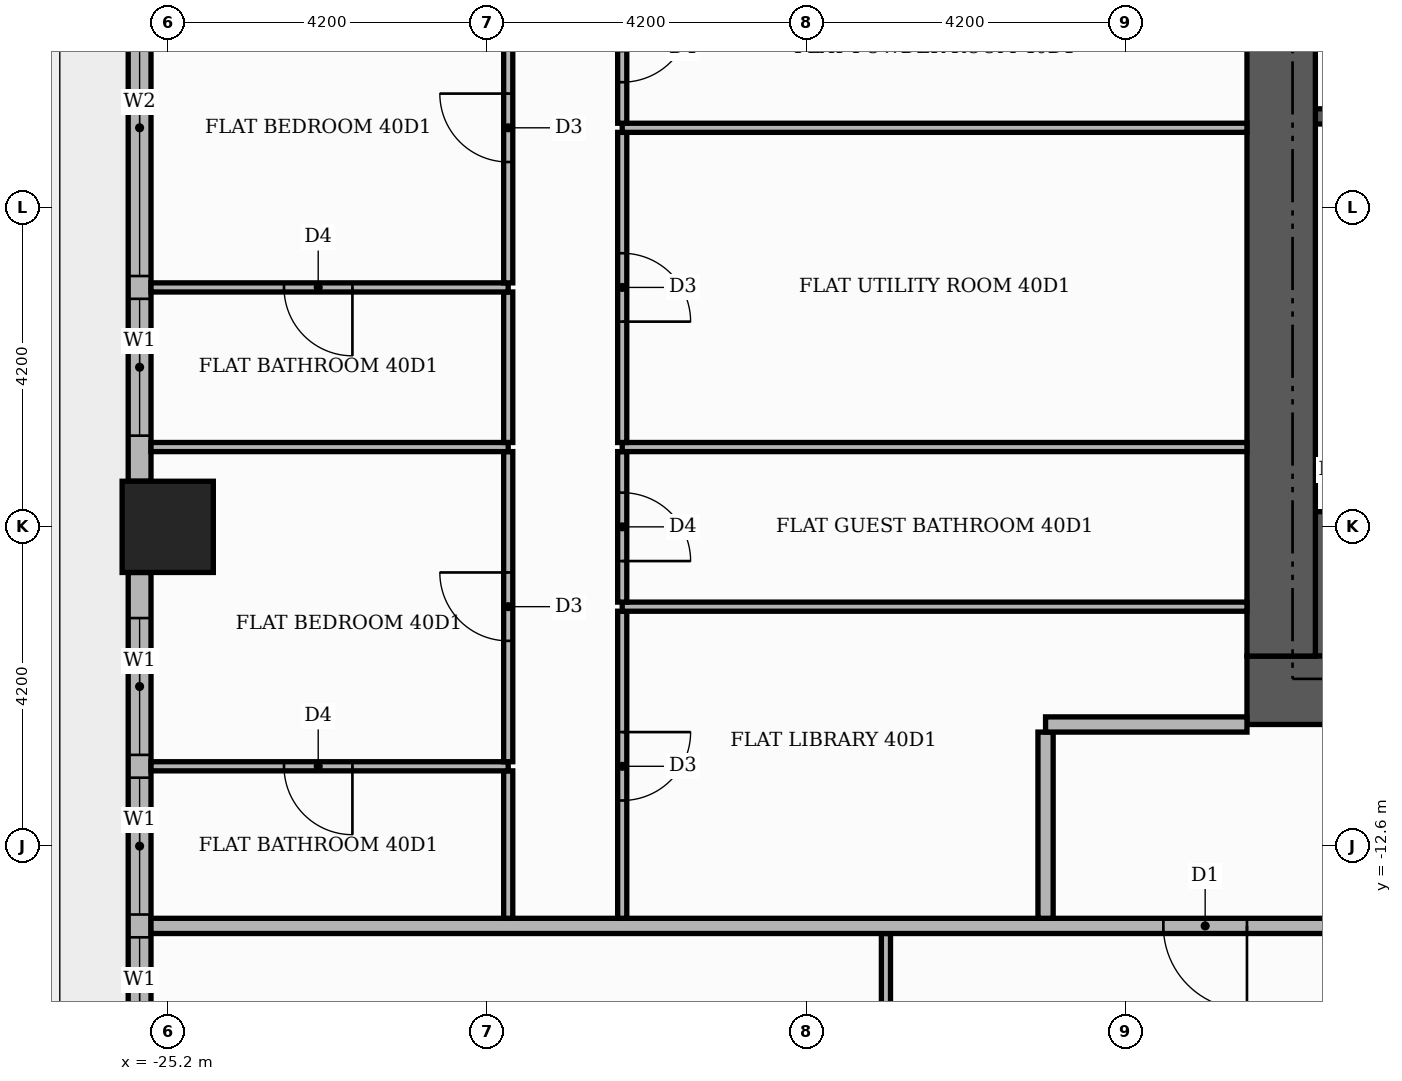
"""IFC4 building model, lengths in metres.
Left out: names, types, materials, properties, quantities, classifications, styles, units other than length and angle.
Written with IfcOpenShell. Run it as: python <this file> out.ifc"""

import sys

from ifc_helpers import new_model, si_unit, direction, frame, frame_2d, origin, origin_2d, place, context, subcontext, project, spatial, rectangle, extrude, element, fill, save


model = new_model("IFC4")
c1 = context("Model", 3, precision=1e-05, world=origin(), true_north=direction((0.0, 1.0)))
c2 = subcontext(c1, "Body", "Model", "MODEL_VIEW")
j1 = project(units=[si_unit("LENGTHUNIT", "METRE"), si_unit("PLANEANGLEUNIT", "RADIAN")], contexts=[c1])
p1 = place(None, origin())
s1 = spatial("IfcSite", under=j1, at=p1, CompositionType="ELEMENT")
p2 = place(p1, origin())
s2 = spatial("IfcBuilding", under=s1, at=p2, CompositionType="ELEMENT")
p3 = place(p2, frame((0.0, 0.0, 168.9)))
s3 = spatial("IfcBuildingStorey", under=s2, at=p3, CompositionType="ELEMENT", Elevation=168.9)
p4 = place(p3, frame((-10.1, -9.15, 0.0), z_axis=(0.0, 0.0, 1.0), x_axis=(1.0, 0.0, 0.0)))
e1 = element("IfcWall", 1, at=p4, inside=s3, PredefinedType="SHEAR", context=c2, shape_type="SweptSolid", body=[
    extrude(rectangle(XDim=4.6, YDim=1.9, at=frame_2d((2.3, 0.0))), origin(), (0.0, 0.0, 1.0), 3.48),
])
p5 = place(p3, frame((-10.1, -3.0, 0.0), z_axis=(0.0, 0.0, 1.0), x_axis=(1.0, 0.0, 0.0)))
e2 = element("IfcWall", 2, at=p5, inside=s3, PredefinedType="SHEAR", context=c2, shape_type="SweptSolid", body=[
    extrude(rectangle(XDim=0.9, YDim=0.2, at=frame_2d((0.45, 0.0))), origin(), (0.0, 0.0, 1.0), 3.48),
])
p6 = place(p3, frame((-11.0, -10.55, 0.0), z_axis=(0.0, 0.0, 1.0), x_axis=(1.0, 0.0, 0.0)))
e3 = element("IfcWall", 3, at=p6, inside=s3, PredefinedType="SHEAR", context=c2, shape_type="SweptSolid", body=[
    extrude(rectangle(XDim=22.0, YDim=0.9, at=frame_2d((11.0, 0.0))), origin(), (0.0, 0.0, 1.0), 3.48),
])
p7 = place(p6, frame((7.4, 0.0, 0.0)))
e4 = element("IfcOpeningElement", 4, at=p7, cuts=e3, PredefinedType="OPENING", context=c2, shape_type="SweptSolid", body=[
    extrude(rectangle(XDim=1.8, YDim=2.2, at=frame_2d((0.9, 1.1))), frame((0.0, 0.46, 0.0), z_axis=(0.0, -1.0, 0.0), x_axis=(1.0, 0.0, 0.0)), (0.0, 0.0, 1.0), 0.92),
])
p8 = place(p3, frame((-10.55, -10.1, 0.0), z_axis=(0.0, 0.0, 1.0), x_axis=(0.0, 1.0, 0.0)))
e5 = element("IfcWall", 5, at=p8, inside=s3, PredefinedType="SHEAR", context=c2, shape_type="SweptSolid", body=[
    extrude(rectangle(XDim=20.2, YDim=0.9, at=frame_2d((10.1, 0.0))), origin(), (0.0, 0.0, 1.0), 3.48),
])
p9 = place(p3, frame((-25.2, -8.4, 0.0), z_axis=(0.0, 0.0, 1.0), x_axis=(1.0, 0.0, 0.0)))
e6 = element("IfcColumn", 6, at=p9, inside=s3, PredefinedType="COLUMN", context=c2, shape_type="SweptSolid", body=[
    extrude(rectangle(XDim=1.2, YDim=1.2, at=origin_2d()), origin(), (0.0, 0.0, 1.0), 3.9),
])
p10 = place(p3, frame((-25.57, -0.6, 0.0), z_axis=(0.0, 0.0, 1.0), x_axis=(0.0, -1.0, 0.0)))
e7 = element("IfcWall", 7, at=p10, inside=s3, PredefinedType="STANDARD", context=c2, shape_type="SweptSolid", body=[
    extrude(rectangle(XDim=7.2, YDim=0.3, at=frame_2d((3.6, 0.0))), origin(), (0.0, 0.0, 1.0), 3.48),
])
p11 = place(p10, frame((0.6, 0.0, 0.9)))
e8 = element("IfcOpeningElement", 8, at=p11, cuts=e7, PredefinedType="OPENING", context=c2, shape_type="SweptSolid", body=[
    extrude(rectangle(XDim=3.9, YDim=2.1, at=frame_2d((1.95, 1.05))), frame((0.0, 0.16, 0.0), z_axis=(0.0, -1.0, 0.0), x_axis=(1.0, 0.0, 0.0)), (0.0, 0.0, 1.0), 0.32),
])
p12 = place(p10, frame((4.8, 0.0, 0.9)))
e9 = element("IfcOpeningElement", 9, at=p12, cuts=e7, PredefinedType="OPENING", context=c2, shape_type="SweptSolid", body=[
    extrude(rectangle(XDim=1.8, YDim=2.1, at=frame_2d((0.9, 1.05))), frame((0.0, 0.16, 0.0), z_axis=(0.0, -1.0, 0.0), x_axis=(1.0, 0.0, 0.0)), (0.0, 0.0, 1.0), 0.32),
])
p13 = place(p3, frame((-25.57, -9.0, 0.0), z_axis=(0.0, 0.0, 1.0), x_axis=(0.0, -1.0, 0.0)))
e10 = element("IfcWall", 10, at=p13, inside=s3, PredefinedType="STANDARD", context=c2, shape_type="SweptSolid", body=[
    extrude(rectangle(XDim=7.2, YDim=0.3, at=frame_2d((3.6, 0.0))), origin(), (0.0, 0.0, 1.0), 3.48),
])
p14 = place(p13, frame((0.6, 0.0, 0.9)))
e11 = element("IfcOpeningElement", 11, at=p14, cuts=e10, PredefinedType="OPENING", context=c2, shape_type="SweptSolid", body=[
    extrude(rectangle(XDim=1.8, YDim=2.1, at=frame_2d((0.9, 1.05))), frame((0.0, 0.16, 0.0), z_axis=(0.0, -1.0, 0.0), x_axis=(1.0, 0.0, 0.0)), (0.0, 0.0, 1.0), 0.32),
])
p15 = place(p13, frame((2.7, 0.0, 0.9)))
e12 = element("IfcOpeningElement", 12, at=p15, cuts=e10, PredefinedType="OPENING", context=c2, shape_type="SweptSolid", body=[
    extrude(rectangle(XDim=1.8, YDim=2.1, at=frame_2d((0.9, 1.05))), frame((0.0, 0.16, 0.0), z_axis=(0.0, -1.0, 0.0), x_axis=(1.0, 0.0, 0.0)), (0.0, 0.0, 1.0), 0.32),
])
p16 = place(p13, frame((4.8, 0.0, 0.9)))
e13 = element("IfcOpeningElement", 13, at=p16, cuts=e10, PredefinedType="OPENING", context=c2, shape_type="SweptSolid", body=[
    extrude(rectangle(XDim=1.8, YDim=2.1, at=frame_2d((0.9, 1.05))), frame((0.0, 0.16, 0.0), z_axis=(0.0, -1.0, 0.0), x_axis=(1.0, 0.0, 0.0)), (0.0, 0.0, 1.0), 0.32),
])
p17 = place(p3, frame((-15.75, -20.06, 0.0), z_axis=(0.0, 0.0, 1.0), x_axis=(0.0, 1.0, 0.0)))
e14 = element("IfcWall", 14, at=p17, inside=s3, PredefinedType="PARTITIONING", context=c2, shape_type="SweptSolid", body=[
    extrude(rectangle(XDim=6.31, YDim=0.12, at=frame_2d((3.155, 0.0))), origin(), (0.0, 0.0, 1.0), 3.48),
])
p18 = place(p17, frame((2.675, 0.0, 0.0)))
e15 = element("IfcOpeningElement", 15, at=p18, cuts=e14, PredefinedType="OPENING", context=c2, shape_type="SweptSolid", body=[
    extrude(rectangle(XDim=1.0, YDim=2.1, at=frame_2d((0.5, 1.05))), frame((0.0, 0.07, 0.0), z_axis=(0.0, -1.0, 0.0), x_axis=(1.0, 0.0, 0.0)), (0.0, 0.0, 1.0), 0.14),
])
p19 = place(p3, frame((-25.42, -13.65, 0.0), z_axis=(0.0, 0.0, 1.0), x_axis=(1.0, 0.0, 0.0)))
e16 = element("IfcWall", 16, at=p19, inside=s3, PredefinedType="PARTITIONING", context=c2, shape_type="SweptSolid", body=[
    extrude(rectangle(XDim=39.07, YDim=0.2, at=frame_2d((19.535, 0.0))), origin(), (0.0, 0.0, 1.0), 3.48),
])
p20 = place(p19, frame((13.32, 0.0, 0.0)))
e17 = element("IfcOpeningElement", 17, at=p20, cuts=e16, PredefinedType="OPENING", context=c2, shape_type="SweptSolid", body=[
    extrude(rectangle(XDim=1.1, YDim=2.4, at=frame_2d((0.55, 1.2))), frame((0.0, 0.11, 0.0), z_axis=(0.0, -1.0, 0.0), x_axis=(1.0, 0.0, 0.0)), (0.0, 0.0, 1.0), 0.22),
])
p21 = place(p19, frame((21.72, 0.0, 0.0)))
e18 = element("IfcOpeningElement", 18, at=p21, cuts=e16, PredefinedType="OPENING", context=c2, shape_type="SweptSolid", body=[
    extrude(rectangle(XDim=1.1, YDim=2.4, at=frame_2d((0.55, 1.2))), frame((0.0, 0.11, 0.0), z_axis=(0.0, -1.0, 0.0), x_axis=(1.0, 0.0, 0.0)), (0.0, 0.0, 1.0), 0.22),
])
p22 = place(p3, frame((-20.72, -13.55, 0.0), z_axis=(0.0, 0.0, 1.0), x_axis=(0.0, 1.0, 0.0)))
e19 = element("IfcWall", 19, at=p22, inside=s3, PredefinedType="PARTITIONING", context=c2, shape_type="SweptSolid", body=[
    extrude(rectangle(XDim=1.94, YDim=0.12, at=frame_2d((0.97, 0.0))), origin(), (0.0, 0.0, 1.0), 3.48),
])
p23 = place(p3, frame((-19.22, -13.55, 0.0), z_axis=(0.0, 0.0, 1.0), x_axis=(0.0, 1.0, 0.0)))
e20 = element("IfcWall", 20, at=p23, inside=s3, PredefinedType="PARTITIONING", context=c2, shape_type="SweptSolid", body=[
    extrude(rectangle(XDim=4.04, YDim=0.12, at=frame_2d((2.02, 0.0))), origin(), (0.0, 0.0, 1.0), 3.48),
])
p24 = place(p23, frame((1.55, 0.0, 0.0)))
e21 = element("IfcOpeningElement", 21, at=p24, cuts=e20, PredefinedType="OPENING", context=c2, shape_type="SweptSolid", body=[
    extrude(rectangle(XDim=0.9, YDim=2.1, at=frame_2d((0.45, 1.05))), frame((0.0, 0.07, 0.0), z_axis=(0.0, -1.0, 0.0), x_axis=(1.0, 0.0, 0.0)), (0.0, 0.0, 1.0), 0.14),
])
p25 = place(p3, frame((-13.65, -13.55, 0.0), z_axis=(0.0, 0.0, 1.0), x_axis=(0.0, 1.0, 0.0)))
e22 = element("IfcWall", 22, at=p25, inside=s3, PredefinedType="PARTITIONING", context=c2, shape_type="SweptSolid", body=[
    extrude(rectangle(XDim=2.45, YDim=0.2, at=frame_2d((1.225, 0.0))), origin(), (0.0, 0.0, 1.0), 3.48),
])
p26 = place(p3, frame((-25.42, -11.55, 0.0), z_axis=(0.0, 0.0, 1.0), x_axis=(1.0, 0.0, 0.0)))
e23 = element("IfcWall", 23, at=p26, inside=s3, PredefinedType="PARTITIONING", context=c2, shape_type="SweptSolid", body=[
    extrude(rectangle(XDim=4.7, YDim=0.12, at=frame_2d((2.35, 0.0))), origin(), (0.0, 0.0, 1.0), 3.48),
])
p27 = place(p26, frame((1.75, 0.0, 0.0)))
e24 = element("IfcOpeningElement", 24, at=p27, cuts=e23, PredefinedType="OPENING", context=c2, shape_type="SweptSolid", body=[
    extrude(rectangle(XDim=0.9, YDim=2.1, at=frame_2d((0.45, 1.05))), frame((0.0, 0.07, 0.0), z_axis=(0.0, -1.0, 0.0), x_axis=(1.0, 0.0, 0.0)), (0.0, 0.0, 1.0), 0.14),
])
p28 = place(p3, frame((-20.72, -11.49, 0.0), z_axis=(0.0, 0.0, 1.0), x_axis=(0.0, 1.0, 0.0)))
e25 = element("IfcWall", 25, at=p28, inside=s3, PredefinedType="PARTITIONING", context=c2, shape_type="SweptSolid", body=[
    extrude(rectangle(XDim=4.08, YDim=0.12, at=frame_2d((2.04, 0.0))), origin(), (0.0, 0.0, 1.0), 3.48),
])
p29 = place(p28, frame((1.59, 0.0, 0.0)))
e26 = element("IfcOpeningElement", 26, at=p29, cuts=e25, PredefinedType="OPENING", context=c2, shape_type="SweptSolid", body=[
    extrude(rectangle(XDim=0.9, YDim=2.1, at=frame_2d((0.45, 1.05))), frame((0.0, 0.07, 0.0), z_axis=(0.0, -1.0, 0.0), x_axis=(1.0, 0.0, 0.0)), (0.0, 0.0, 1.0), 0.14),
])
p30 = place(p3, frame((-13.65, -11.0, 0.0), z_axis=(0.0, 0.0, 1.0), x_axis=(1.0, 0.0, 0.0)))
e27 = element("IfcWall", 27, at=p30, inside=s3, PredefinedType="PARTITIONING", context=c2, shape_type="SweptSolid", body=[
    extrude(rectangle(XDim=2.65, YDim=0.2, at=frame_2d((1.325, 0.0))), origin(), (0.0, 0.0, 1.0), 3.48),
])
p31 = place(p3, frame((-19.22, -9.45, 0.0), z_axis=(0.0, 0.0, 1.0), x_axis=(1.0, 0.0, 0.0)))
e28 = element("IfcWall", 28, at=p31, inside=s3, PredefinedType="PARTITIONING", context=c2, shape_type="SweptSolid", body=[
    extrude(rectangle(XDim=8.22, YDim=0.12, at=frame_2d((4.11, 0.0))), origin(), (0.0, 0.0, 1.0), 3.48),
])
p32 = place(p3, frame((-19.22, -9.39, 0.0), z_axis=(0.0, 0.0, 1.0), x_axis=(0.0, 1.0, 0.0)))
e29 = element("IfcWall", 29, at=p32, inside=s3, PredefinedType="PARTITIONING", context=c2, shape_type="SweptSolid", body=[
    extrude(rectangle(XDim=1.98, YDim=0.12, at=frame_2d((0.99, 0.0))), origin(), (0.0, 0.0, 1.0), 3.48),
])
p33 = place(p32, frame((0.54, 0.0, 0.0)))
e30 = element("IfcOpeningElement", 30, at=p33, cuts=e29, PredefinedType="OPENING", context=c2, shape_type="SweptSolid", body=[
    extrude(rectangle(XDim=0.9, YDim=2.1, at=frame_2d((0.45, 1.05))), frame((0.0, 0.07, 0.0), z_axis=(0.0, -1.0, 0.0), x_axis=(1.0, 0.0, 0.0)), (0.0, 0.0, 1.0), 0.14),
])
p34 = place(p3, frame((-25.42, -7.35, 0.0), z_axis=(0.0, 0.0, 1.0), x_axis=(1.0, 0.0, 0.0)))
e31 = element("IfcWall", 31, at=p34, inside=s3, PredefinedType="PARTITIONING", context=c2, shape_type="SweptSolid", body=[
    extrude(rectangle(XDim=4.7, YDim=0.12, at=frame_2d((2.35, 0.0))), origin(), (0.0, 0.0, 1.0), 3.48),
])
p35 = place(p3, frame((-19.22, -7.35, 0.0), z_axis=(0.0, 0.0, 1.0), x_axis=(1.0, 0.0, 0.0)))
e32 = element("IfcWall", 32, at=p35, inside=s3, PredefinedType="PARTITIONING", context=c2, shape_type="SweptSolid", body=[
    extrude(rectangle(XDim=8.22, YDim=0.12, at=frame_2d((4.11, 0.0))), origin(), (0.0, 0.0, 1.0), 3.48),
])
p36 = place(p3, frame((-20.72, -7.29, 0.0), z_axis=(0.0, 0.0, 1.0), x_axis=(0.0, 1.0, 0.0)))
e33 = element("IfcWall", 33, at=p36, inside=s3, PredefinedType="PARTITIONING", context=c2, shape_type="SweptSolid", body=[
    extrude(rectangle(XDim=1.98, YDim=0.12, at=frame_2d((0.99, 0.0))), origin(), (0.0, 0.0, 1.0), 3.48),
])
p37 = place(p3, frame((-19.22, -7.29, 0.0), z_axis=(0.0, 0.0, 1.0), x_axis=(0.0, 1.0, 0.0)))
e34 = element("IfcWall", 34, at=p37, inside=s3, PredefinedType="PARTITIONING", context=c2, shape_type="SweptSolid", body=[
    extrude(rectangle(XDim=4.08, YDim=0.12, at=frame_2d((2.04, 0.0))), origin(), (0.0, 0.0, 1.0), 3.48),
])
p38 = place(p37, frame((1.59, 0.0, 0.0)))
e35 = element("IfcOpeningElement", 35, at=p38, cuts=e34, PredefinedType="OPENING", context=c2, shape_type="SweptSolid", body=[
    extrude(rectangle(XDim=0.9, YDim=2.1, at=frame_2d((0.45, 1.05))), frame((0.0, 0.07, 0.0), z_axis=(0.0, -1.0, 0.0), x_axis=(1.0, 0.0, 0.0)), (0.0, 0.0, 1.0), 0.14),
])
p39 = place(p3, frame((-25.42, -5.25, 0.0), z_axis=(0.0, 0.0, 1.0), x_axis=(1.0, 0.0, 0.0)))
e36 = element("IfcWall", 36, at=p39, inside=s3, PredefinedType="PARTITIONING", context=c2, shape_type="SweptSolid", body=[
    extrude(rectangle(XDim=4.7, YDim=0.12, at=frame_2d((2.35, 0.0))), origin(), (0.0, 0.0, 1.0), 3.48),
])
p40 = place(p39, frame((1.75, 0.0, 0.0)))
e37 = element("IfcOpeningElement", 37, at=p40, cuts=e36, PredefinedType="OPENING", context=c2, shape_type="SweptSolid", body=[
    extrude(rectangle(XDim=0.9, YDim=2.1, at=frame_2d((0.45, 1.05))), frame((0.0, 0.07, 0.0), z_axis=(0.0, -1.0, 0.0), x_axis=(1.0, 0.0, 0.0)), (0.0, 0.0, 1.0), 0.14),
])
p41 = place(p3, frame((-20.72, -5.19, 0.0), z_axis=(0.0, 0.0, 1.0), x_axis=(0.0, 1.0, 0.0)))
e38 = element("IfcWall", 38, at=p41, inside=s3, PredefinedType="PARTITIONING", context=c2, shape_type="SweptSolid", body=[
    extrude(rectangle(XDim=4.08, YDim=0.12, at=frame_2d((2.04, 0.0))), origin(), (0.0, 0.0, 1.0), 3.48),
])
p42 = place(p41, frame((1.59, 0.0, 0.0)))
e39 = element("IfcOpeningElement", 39, at=p42, cuts=e38, PredefinedType="OPENING", context=c2, shape_type="SweptSolid", body=[
    extrude(rectangle(XDim=0.9, YDim=2.1, at=frame_2d((0.45, 1.05))), frame((0.0, 0.07, 0.0), z_axis=(0.0, -1.0, 0.0), x_axis=(1.0, 0.0, 0.0)), (0.0, 0.0, 1.0), 0.14),
])
p43 = place(p3, frame((-19.22, -3.15, 0.0), z_axis=(0.0, 0.0, 1.0), x_axis=(1.0, 0.0, 0.0)))
e40 = element("IfcWall", 40, at=p43, inside=s3, PredefinedType="PARTITIONING", context=c2, shape_type="SweptSolid", body=[
    extrude(rectangle(XDim=8.22, YDim=0.12, at=frame_2d((4.11, 0.0))), origin(), (0.0, 0.0, 1.0), 3.48),
])
p44 = place(p3, frame((-19.22, -3.09, 0.0), z_axis=(0.0, 0.0, 1.0), x_axis=(0.0, 1.0, 0.0)))
e41 = element("IfcWall", 41, at=p44, inside=s3, PredefinedType="PARTITIONING", context=c2, shape_type="SweptSolid", body=[
    extrude(rectangle(XDim=1.98, YDim=0.12, at=frame_2d((0.99, 0.0))), origin(), (0.0, 0.0, 1.0), 3.48),
])
p45 = place(p44, frame((0.54, 0.0, 0.0)))
e42 = element("IfcOpeningElement", 42, at=p45, cuts=e41, PredefinedType="OPENING", context=c2, shape_type="SweptSolid", body=[
    extrude(rectangle(XDim=0.9, YDim=2.1, at=frame_2d((0.45, 1.05))), frame((0.0, 0.07, 0.0), z_axis=(0.0, -1.0, 0.0), x_axis=(1.0, 0.0, 0.0)), (0.0, 0.0, 1.0), 0.14),
])
p46 = place(p11, origin())
e43 = element("IfcWindow", 43, at=p46, inside=s3, PartitioningType="SINGLE_PANEL", PredefinedType="WINDOW", context=c2, shape_type="SweptSolid", body=[
    extrude(rectangle(XDim=3.9, YDim=2.1, at=frame_2d((1.95, 1.05))), frame((0.0, 0.03, 0.0), z_axis=(0.0, -1.0, 0.0), x_axis=(1.0, 0.0, 0.0)), (0.0, 0.0, 1.0), 0.06),
])
fill(e8, e43)
p47 = place(p12, origin())
e44 = element("IfcWindow", 44, at=p47, inside=s3, PartitioningType="SINGLE_PANEL", PredefinedType="WINDOW", context=c2, shape_type="SweptSolid", body=[
    extrude(rectangle(XDim=1.8, YDim=2.1, at=frame_2d((0.9, 1.05))), frame((0.0, 0.03, 0.0), z_axis=(0.0, -1.0, 0.0), x_axis=(1.0, 0.0, 0.0)), (0.0, 0.0, 1.0), 0.06),
])
fill(e9, e44)
p48 = place(p14, origin())
e45 = element("IfcWindow", 45, at=p48, inside=s3, PartitioningType="SINGLE_PANEL", PredefinedType="WINDOW", context=c2, shape_type="SweptSolid", body=[
    extrude(rectangle(XDim=1.8, YDim=2.1, at=frame_2d((0.9, 1.05))), frame((0.0, 0.03, 0.0), z_axis=(0.0, -1.0, 0.0), x_axis=(1.0, 0.0, 0.0)), (0.0, 0.0, 1.0), 0.06),
])
fill(e11, e45)
p49 = place(p15, origin())
e46 = element("IfcWindow", 46, at=p49, inside=s3, PartitioningType="SINGLE_PANEL", PredefinedType="WINDOW", context=c2, shape_type="SweptSolid", body=[
    extrude(rectangle(XDim=1.8, YDim=2.1, at=frame_2d((0.9, 1.05))), frame((0.0, 0.03, 0.0), z_axis=(0.0, -1.0, 0.0), x_axis=(1.0, 0.0, 0.0)), (0.0, 0.0, 1.0), 0.06),
])
fill(e12, e46)
p50 = place(p16, origin())
e47 = element("IfcWindow", 47, at=p50, inside=s3, PartitioningType="SINGLE_PANEL", PredefinedType="WINDOW", context=c2, shape_type="SweptSolid", body=[
    extrude(rectangle(XDim=1.8, YDim=2.1, at=frame_2d((0.9, 1.05))), frame((0.0, 0.03, 0.0), z_axis=(0.0, -1.0, 0.0), x_axis=(1.0, 0.0, 0.0)), (0.0, 0.0, 1.0), 0.06),
])
fill(e13, e47)
p51 = place(p20, frame((1.1, 0.0, 0.0), z_axis=(0.0, 0.0, 1.0), x_axis=(-1.0, 0.0, 0.0)))
e48 = element("IfcDoor", 48, at=p51, inside=s3, OperationType="SINGLE_SWING_RIGHT", PredefinedType="DOOR", context=c2, shape_type="SweptSolid", body=[
    extrude(rectangle(XDim=1.1, YDim=2.4, at=frame_2d((0.55, 1.2))), frame((0.0, 0.025, 0.0), z_axis=(0.0, -1.0, 0.0), x_axis=(1.0, 0.0, 0.0)), (0.0, 0.0, 1.0), 0.05),
])
fill(e17, e48)
p52 = place(p45, frame((0.9, 0.0, 0.0), z_axis=(0.0, 0.0, 1.0), x_axis=(-1.0, 0.0, 0.0)))
e49 = element("IfcDoor", 49, at=p52, inside=s3, OperationType="SINGLE_SWING_RIGHT", PredefinedType="DOOR", context=c2, shape_type="SweptSolid", body=[
    extrude(rectangle(XDim=0.9, YDim=2.1, at=frame_2d((0.45, 1.05))), frame((0.0, 0.025, 0.0), z_axis=(0.0, -1.0, 0.0), x_axis=(1.0, 0.0, 0.0)), (0.0, 0.0, 1.0), 0.05),
])
fill(e42, e49)
p53 = place(p38, frame((0.9, 0.0, 0.0), z_axis=(0.0, 0.0, 1.0), x_axis=(-1.0, 0.0, 0.0)))
e50 = element("IfcDoor", 50, at=p53, inside=s3, OperationType="SINGLE_SWING_LEFT", PredefinedType="DOOR", context=c2, shape_type="SweptSolid", body=[
    extrude(rectangle(XDim=0.9, YDim=2.1, at=frame_2d((0.45, 1.05))), frame((0.0, 0.025, 0.0), z_axis=(0.0, -1.0, 0.0), x_axis=(1.0, 0.0, 0.0)), (0.0, 0.0, 1.0), 0.05),
])
fill(e35, e50)
p54 = place(p33, frame((0.9, 0.0, 0.0), z_axis=(0.0, 0.0, 1.0), x_axis=(-1.0, 0.0, 0.0)))
e51 = element("IfcDoor", 51, at=p54, inside=s3, OperationType="SINGLE_SWING_LEFT", PredefinedType="DOOR", context=c2, shape_type="SweptSolid", body=[
    extrude(rectangle(XDim=0.9, YDim=2.1, at=frame_2d((0.45, 1.05))), frame((0.0, 0.025, 0.0), z_axis=(0.0, -1.0, 0.0), x_axis=(1.0, 0.0, 0.0)), (0.0, 0.0, 1.0), 0.05),
])
fill(e30, e51)
p55 = place(p24, frame((0.9, 0.0, 0.0), z_axis=(0.0, 0.0, 1.0), x_axis=(-1.0, 0.0, 0.0)))
e52 = element("IfcDoor", 52, at=p55, inside=s3, OperationType="SINGLE_SWING_RIGHT", PredefinedType="DOOR", context=c2, shape_type="SweptSolid", body=[
    extrude(rectangle(XDim=0.9, YDim=2.1, at=frame_2d((0.45, 1.05))), frame((0.0, 0.025, 0.0), z_axis=(0.0, -1.0, 0.0), x_axis=(1.0, 0.0, 0.0)), (0.0, 0.0, 1.0), 0.05),
])
fill(e21, e52)
p56 = place(p42, origin())
e53 = element("IfcDoor", 53, at=p56, inside=s3, OperationType="SINGLE_SWING_RIGHT", PredefinedType="DOOR", context=c2, shape_type="SweptSolid", body=[
    extrude(rectangle(XDim=0.9, YDim=2.1, at=frame_2d((0.45, 1.05))), frame((0.0, 0.025, 0.0), z_axis=(0.0, -1.0, 0.0), x_axis=(1.0, 0.0, 0.0)), (0.0, 0.0, 1.0), 0.05),
])
fill(e39, e53)
p57 = place(p40, frame((0.9, 0.0, 0.0), z_axis=(0.0, 0.0, 1.0), x_axis=(-1.0, 0.0, 0.0)))
e54 = element("IfcDoor", 54, at=p57, inside=s3, OperationType="SINGLE_SWING_RIGHT", PredefinedType="DOOR", context=c2, shape_type="SweptSolid", body=[
    extrude(rectangle(XDim=0.9, YDim=2.1, at=frame_2d((0.45, 1.05))), frame((0.0, 0.025, 0.0), z_axis=(0.0, -1.0, 0.0), x_axis=(1.0, 0.0, 0.0)), (0.0, 0.0, 1.0), 0.05),
])
fill(e37, e54)
p58 = place(p29, origin())
e55 = element("IfcDoor", 55, at=p58, inside=s3, OperationType="SINGLE_SWING_RIGHT", PredefinedType="DOOR", context=c2, shape_type="SweptSolid", body=[
    extrude(rectangle(XDim=0.9, YDim=2.1, at=frame_2d((0.45, 1.05))), frame((0.0, 0.025, 0.0), z_axis=(0.0, -1.0, 0.0), x_axis=(1.0, 0.0, 0.0)), (0.0, 0.0, 1.0), 0.05),
])
fill(e26, e55)
p59 = place(p27, frame((0.9, 0.0, 0.0), z_axis=(0.0, 0.0, 1.0), x_axis=(-1.0, 0.0, 0.0)))
e56 = element("IfcDoor", 56, at=p59, inside=s3, OperationType="SINGLE_SWING_RIGHT", PredefinedType="DOOR", context=c2, shape_type="SweptSolid", body=[
    extrude(rectangle(XDim=0.9, YDim=2.1, at=frame_2d((0.45, 1.05))), frame((0.0, 0.025, 0.0), z_axis=(0.0, -1.0, 0.0), x_axis=(1.0, 0.0, 0.0)), (0.0, 0.0, 1.0), 0.05),
])
fill(e24, e56)
save(model, sys.argv[1])
